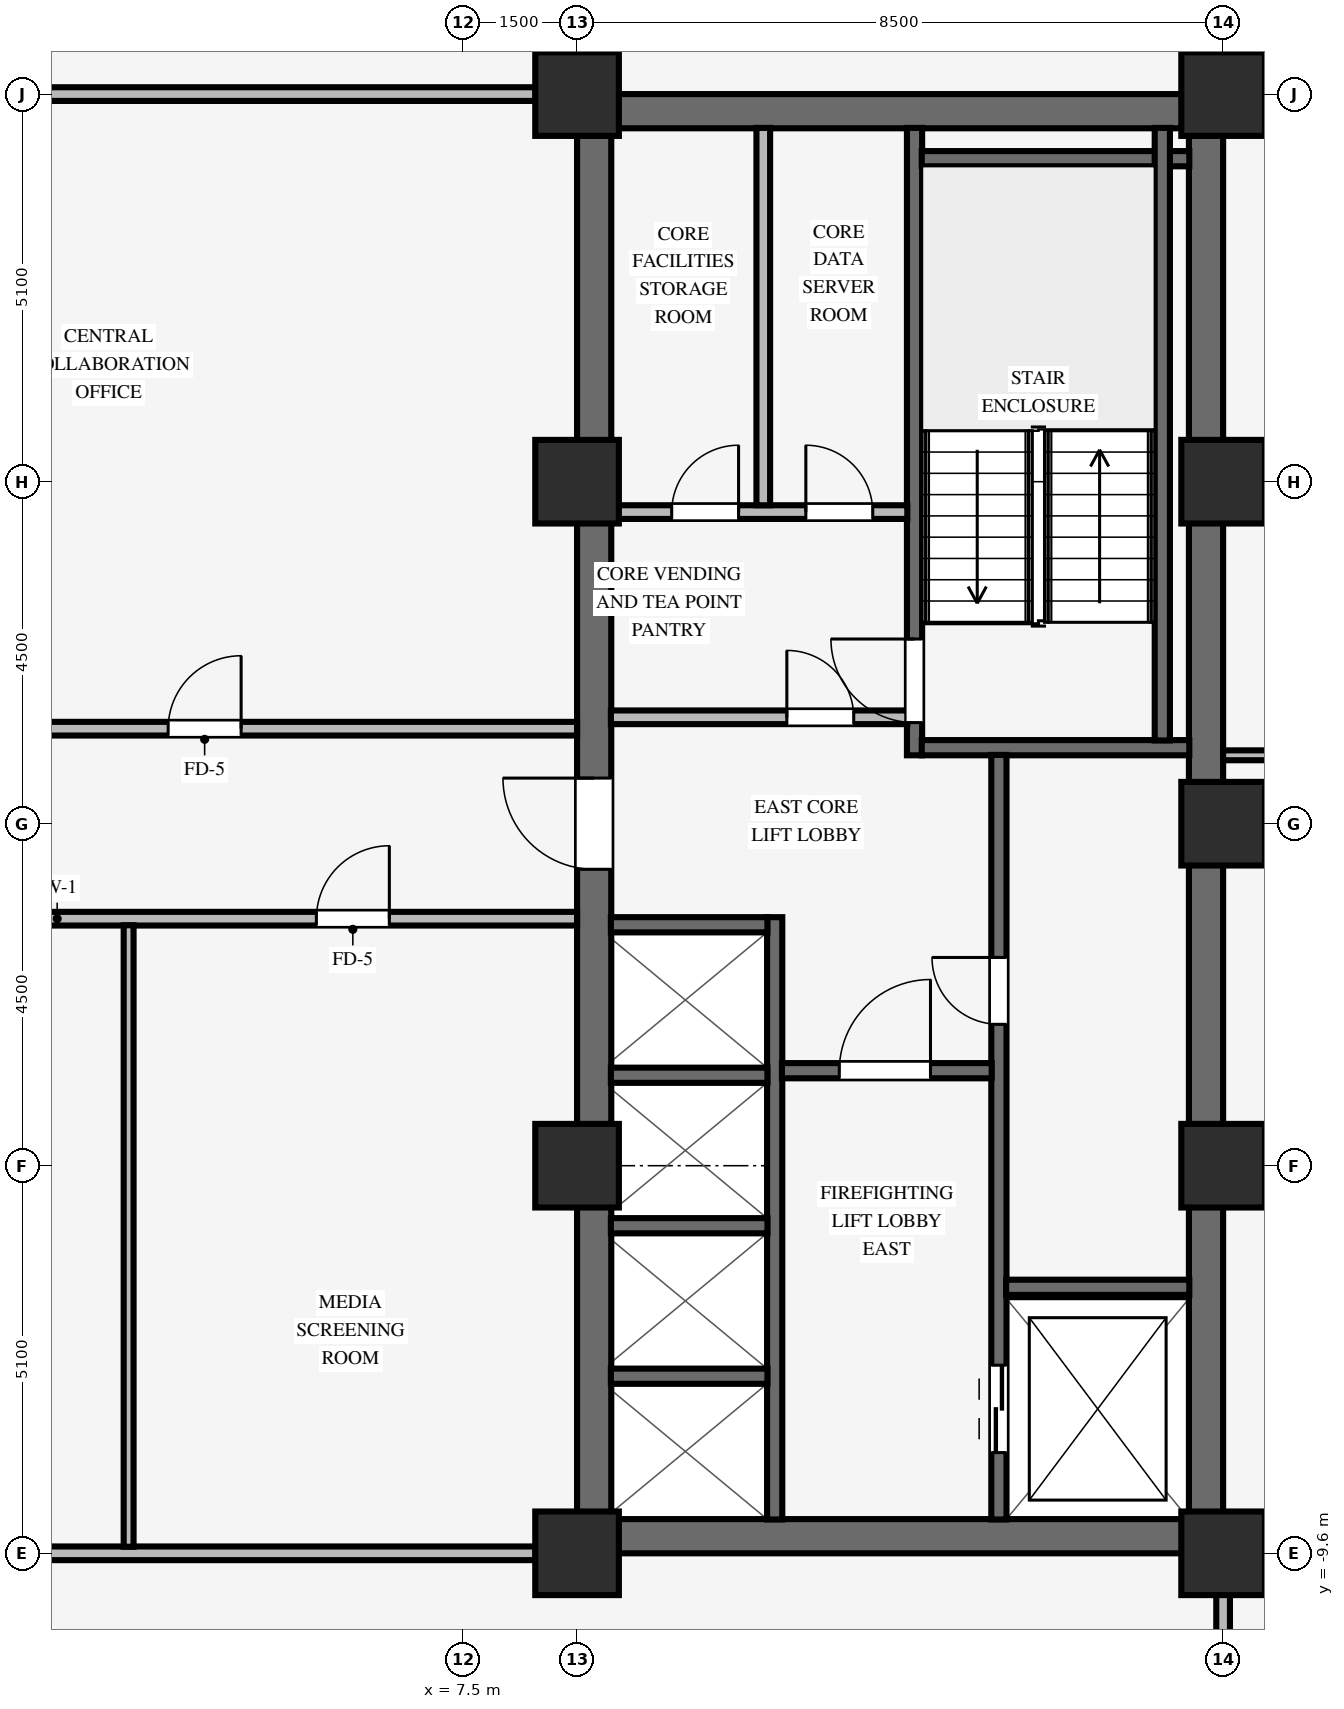
"""IFC4 building model, lengths in metres.
Left out: names, types, materials, properties, quantities, classifications, styles, units other than length and angle.
Written with IfcOpenShell. Run it as: python <this file> out.ifc"""

import sys

from ifc_helpers import new_model, si_unit, direction, frame, frame_2d, origin, origin_2d, place, context, subcontext, project, spatial, rectangle, extrude, source, transform, mapped, element, fill, save


model = new_model("IFC4")
c1 = context("Model", 3, precision=1e-05, world=origin(), true_north=direction((0.0, 1.0)))
c2 = subcontext(c1, "Body", "Model", "MODEL_VIEW")
j1 = project(units=[si_unit("LENGTHUNIT", "METRE"), si_unit("PLANEANGLEUNIT", "RADIAN")], contexts=[c1])
p1 = place(None, origin())
s1 = spatial("IfcSite", under=j1, at=p1, CompositionType="ELEMENT")
p2 = place(p1, origin())
s2 = spatial("IfcBuilding", under=s1, at=p2, CompositionType="ELEMENT")
p3 = place(p2, frame((0.0, 0.0, 60.45)))
s3 = spatial("IfcBuildingStorey", under=s2, at=p3, CompositionType="ELEMENT", Elevation=60.45)
for number, where, z_axis, x_axis in (
    (1, (9.0, -9.375, 0.0), (0.0, 0.0, 1.0), (1.0, 0.0, 0.0)),
    (2, (9.0, 9.375, 0.0), (0.0, 0.0, 1.0), (1.0, 0.0, 0.0)),
):
    element("IfcWall", number, at=place(p3, frame(where, z_axis=z_axis, x_axis=x_axis)), inside=s3, PredefinedType="SHEAR", context=c2, shape_type="SweptSolid", body=[
        extrude(rectangle(XDim=8.5, YDim=0.45, at=frame_2d((4.25, 0.0))), origin(), (0.0, 0.0, 1.0), 3.37),
    ])
p4 = place(p3, frame((9.225, -9.155, 0.0), z_axis=(0.0, 0.0, 1.0), x_axis=(0.0, 1.0, 0.0)))
e3 = element("IfcWall", 3, at=p4, inside=s3, PredefinedType="SHEAR", context=c2, shape_type="SweptSolid", body=[
    extrude(rectangle(XDim=18.31, YDim=0.45, at=frame_2d((9.155, 0.0))), origin(), (0.0, 0.0, 1.0), 3.37),
])
p5 = place(p4, frame((8.555, 0.0, 0.0)))
e4 = element("IfcOpeningElement", 4, at=p5, cuts=e3, PredefinedType="OPENING", context=c2, shape_type="SweptSolid", body=[
    extrude(rectangle(XDim=1.2, YDim=2.15, at=frame_2d((0.6, 1.075))), frame((0.0, 0.235, 0.0), z_axis=(0.0, -1.0, 0.0), x_axis=(1.0, 0.0, 0.0)), (0.0, 0.0, 1.0), 0.47),
])
p6 = place(p3, frame((17.275, -9.155, 0.0), z_axis=(0.0, 0.0, 1.0), x_axis=(0.0, 1.0, 0.0)))
e5 = element("IfcWall", 5, at=p6, inside=s3, PredefinedType="SHEAR", context=c2, shape_type="SweptSolid", body=[
    extrude(rectangle(XDim=18.31, YDim=0.45, at=frame_2d((9.155, 0.0))), origin(), (0.0, 0.0, 1.0), 3.37),
])
for number, where, z_axis, x_axis in (
    (6, (9.0, -9.6, 0.0), (0.0, 0.0, 1.0), (1.0, 0.0, 0.0)),
    (7, (9.0, -4.5, 0.0), (0.0, 0.0, 1.0), (1.0, 0.0, 0.0)),
    (8, (9.0, 4.5, 0.0), (0.0, 0.0, 1.0), (1.0, 0.0, 0.0)),
    (9, (9.0, 9.6, 0.0), (0.0, 0.0, 1.0), (1.0, 0.0, 0.0)),
    (10, (17.5, -9.6, 0.0), (0.0, 0.0, 1.0), (1.0, 0.0, 0.0)),
    (11, (17.5, -4.5, 0.0), (0.0, 0.0, 1.0), (1.0, 0.0, 0.0)),
    (12, (17.5, 4.5, 0.0), (0.0, 0.0, 1.0), (1.0, 0.0, 0.0)),
    (13, (17.5, 9.6, 0.0), (0.0, 0.0, 1.0), (1.0, 0.0, 0.0)),
    (14, (17.5, 0.0, 0.0), (0.0, 0.0, 1.0), (1.0, 0.0, 0.0)),
):
    element("IfcColumn", number, at=place(p3, frame(where, z_axis=z_axis, x_axis=x_axis)), inside=s3, PredefinedType="COLUMN", context=c2, shape_type="SweptSolid", body=[
        extrude(rectangle(XDim=1.1, YDim=1.1, at=origin_2d()), origin(), (0.0, 0.0, 1.0), 3.37),
    ])
p7 = place(p3, frame((13.44, 0.9, 0.0), z_axis=(0.0, 0.0, 1.0), x_axis=(0.0, 1.0, 0.0)))
e15 = element("IfcWall", 15, at=p7, inside=s3, PredefinedType="SHEAR", context=c2, shape_type="SweptSolid", body=[
    extrude(rectangle(XDim=8.255, YDim=0.2, at=frame_2d((4.127, 0.0))), origin(), (0.0, 0.0, 1.0), 3.37),
])
p8 = place(p7, frame((0.43, 0.0, 0.0)))
e16 = element("IfcOpeningElement", 16, at=p8, cuts=e15, PredefinedType="OPENING", context=c2, shape_type="SweptSolid", body=[
    extrude(rectangle(XDim=1.1, YDim=2.15, at=frame_2d((0.55, 1.075))), frame((0.0, 0.11, 0.0), z_axis=(0.0, -1.0, 0.0), x_axis=(1.0, 0.0, 0.0)), (0.0, 0.0, 1.0), 0.22),
])
for number, where, z_axis, x_axis in (
    (17, (13.535, 1.0, 0.0), (0.0, 0.0, 1.0), (1.0, 0.0, 0.0)),
    (18, (13.535, 8.75, 0.0), (0.0, 0.0, 1.0), (1.0, 0.0, 0.0)),
):
    element("IfcWall", number, at=place(p3, frame(where, z_axis=z_axis, x_axis=x_axis)), inside=s3, PredefinedType="SHEAR", context=c2, shape_type="SweptSolid", body=[
        extrude(rectangle(XDim=3.52, YDim=0.2, at=frame_2d((1.76, 0.0))), origin(), (0.0, 0.0, 1.0), 3.37),
    ])
p9 = place(p3, frame((16.7, 1.095, 0.0), z_axis=(0.0, 0.0, 1.0), x_axis=(0.0, 1.0, 0.0)))
e19 = element("IfcWall", 19, at=p9, inside=s3, PredefinedType="SHEAR", context=c2, shape_type="SweptSolid", body=[
    extrude(rectangle(XDim=8.06, YDim=0.2, at=frame_2d((4.03, 0.0))), origin(), (0.0, 0.0, 1.0), 3.37),
])
p10 = place(p3, frame((14.55, -9.155, 0.0), z_axis=(0.0, 0.0, 1.0), x_axis=(0.0, 1.0, 0.0)))
e20 = element("IfcWall", 20, at=p10, inside=s3, PredefinedType="SHEAR", context=c2, shape_type="SweptSolid", body=[
    extrude(rectangle(XDim=10.06, YDim=0.2, at=frame_2d((5.03, 0.0))), origin(), (0.0, 0.0, 1.0), 3.37),
])
p11 = place(p10, frame((6.515, 0.0, 0.0)))
e21 = element("IfcOpeningElement", 21, at=p11, cuts=e20, PredefinedType="OPENING", context=c2, shape_type="SweptSolid", body=[
    extrude(rectangle(XDim=0.88, YDim=2.1, at=frame_2d((0.44, 1.05))), frame((0.0, 0.11, 0.0), z_axis=(0.0, -1.0, 0.0), x_axis=(1.0, 0.0, 0.0)), (0.0, 0.0, 1.0), 0.22),
])
p12 = place(p10, frame((0.88, 0.0, 0.0)))
e22 = element("IfcOpeningElement", 22, at=p12, cuts=e20, PredefinedType="OPENING", context=c2, shape_type="SweptSolid", body=[
    extrude(rectangle(XDim=1.15, YDim=2.15, at=frame_2d((0.575, 1.075))), frame((0.0, 0.11, 0.0), z_axis=(0.0, -1.0, 0.0), x_axis=(1.0, 0.0, 0.0)), (0.0, 0.0, 1.0), 0.22),
])
p13 = place(p3, frame((14.645, -6.1, 0.0), z_axis=(0.0, 0.0, 1.0), x_axis=(1.0, 0.0, 0.0)))
e23 = element("IfcWall", 23, at=p13, inside=s3, PredefinedType="SHEAR", context=c2, shape_type="SweptSolid", body=[
    extrude(rectangle(XDim=2.41, YDim=0.2, at=frame_2d((1.205, 0.0))), origin(), (0.0, 0.0, 1.0), 3.37),
])
p14 = place(p3, frame((11.6, -9.155, 0.0), z_axis=(0.0, 0.0, 1.0), x_axis=(0.0, 1.0, 0.0)))
e24 = element("IfcWall", 24, at=p14, inside=s3, PredefinedType="SHEAR", context=c2, shape_type="SweptSolid", body=[
    extrude(rectangle(XDim=7.925, YDim=0.2, at=frame_2d((3.962, 0.0))), origin(), (0.0, 0.0, 1.0), 3.37),
])
p15 = place(p3, frame((11.695, -3.25, 0.0), z_axis=(0.0, 0.0, 1.0), x_axis=(1.0, 0.0, 0.0)))
e25 = element("IfcWall", 25, at=p15, inside=s3, PredefinedType="SHEAR", context=c2, shape_type="SweptSolid", body=[
    extrude(rectangle(XDim=2.76, YDim=0.2, at=frame_2d((1.38, 0.0))), origin(), (0.0, 0.0, 1.0), 3.37),
])
p16 = place(p15, frame((0.755, 0.0, 0.0)))
e26 = element("IfcOpeningElement", 26, at=p16, cuts=e25, PredefinedType="OPENING", context=c2, shape_type="SweptSolid", body=[
    extrude(rectangle(XDim=1.2, YDim=2.15, at=frame_2d((0.6, 1.075))), frame((0.0, 0.11, 0.0), z_axis=(0.0, -1.0, 0.0), x_axis=(1.0, 0.0, 0.0)), (0.0, 0.0, 1.0), 0.22),
])
for number, where, z_axis, x_axis in (
    (27, (9.445, -7.27, 0.0), (0.0, 0.0, 1.0), (1.0, 0.0, 0.0)),
    (28, (9.445, -5.29, 0.0), (0.0, 0.0, 1.0), (1.0, 0.0, 0.0)),
    (29, (9.445, -3.31, 0.0), (0.0, 0.0, 1.0), (1.0, 0.0, 0.0)),
    (30, (9.445, -1.33, 0.0), (0.0, 0.0, 1.0), (1.0, 0.0, 0.0)),
):
    element("IfcWall", number, at=place(p3, frame(where, z_axis=z_axis, x_axis=x_axis)), inside=s3, PredefinedType="SHEAR", context=c2, shape_type="SweptSolid", body=[
        extrude(rectangle(XDim=2.06, YDim=0.2, at=frame_2d((1.03, 0.0))), origin(), (0.0, 0.0, 1.0), 3.37),
    ])
p17 = place(p3, frame((9.445, 1.4, 0.0), z_axis=(0.0, 0.0, 1.0), x_axis=(1.0, 0.0, 0.0)))
e31 = element("IfcWall", 31, at=p17, inside=s3, PredefinedType="PARTITIONING", context=c2, shape_type="SweptSolid", body=[
    extrude(rectangle(XDim=3.9, YDim=0.18, at=frame_2d((1.95, 0.0))), origin(), (0.0, 0.0, 1.0), 3.36),
])
p18 = place(p17, frame((2.315, 0.0, 0.0)))
e32 = element("IfcOpeningElement", 32, at=p18, cuts=e31, PredefinedType="OPENING", context=c2, shape_type="SweptSolid", body=[
    extrude(rectangle(XDim=0.88, YDim=2.1, at=frame_2d((0.44, 1.05))), frame((0.0, 0.1, 0.0), z_axis=(0.0, -1.0, 0.0), x_axis=(1.0, 0.0, 0.0)), (0.0, 0.0, 1.0), 0.2),
])
p19 = place(p3, frame((9.445, 4.1, 0.0), z_axis=(0.0, 0.0, 1.0), x_axis=(1.0, 0.0, 0.0)))
e33 = element("IfcWall", 33, at=p19, inside=s3, PredefinedType="PARTITIONING", context=c2, shape_type="SweptSolid", body=[
    extrude(rectangle(XDim=3.9, YDim=0.18, at=frame_2d((1.95, 0.0))), origin(), (0.0, 0.0, 1.0), 3.36),
])
p20 = place(p19, frame((0.8, 0.0, 0.0)))
e34 = element("IfcOpeningElement", 34, at=p20, cuts=e33, PredefinedType="OPENING", context=c2, shape_type="SweptSolid", body=[
    extrude(rectangle(XDim=0.88, YDim=2.1, at=frame_2d((0.44, 1.05))), frame((0.0, 0.1, 0.0), z_axis=(0.0, -1.0, 0.0), x_axis=(1.0, 0.0, 0.0)), (0.0, 0.0, 1.0), 0.2),
])
p21 = place(p19, frame((2.565, 0.0, 0.0)))
e35 = element("IfcOpeningElement", 35, at=p21, cuts=e33, PredefinedType="OPENING", context=c2, shape_type="SweptSolid", body=[
    extrude(rectangle(XDim=0.88, YDim=2.1, at=frame_2d((0.44, 1.05))), frame((0.0, 0.1, 0.0), z_axis=(0.0, -1.0, 0.0), x_axis=(1.0, 0.0, 0.0)), (0.0, 0.0, 1.0), 0.2),
])
p22 = place(p3, frame((11.45, 4.19, 0.0), z_axis=(0.0, 0.0, 1.0), x_axis=(0.0, 1.0, 0.0)))
e36 = element("IfcWall", 36, at=p22, inside=s3, PredefinedType="PARTITIONING", context=c2, shape_type="SweptSolid", body=[
    extrude(rectangle(XDim=4.965, YDim=0.18, at=frame_2d((2.482, 0.0))), origin(), (0.0, 0.0, 1.0), 3.36),
])
p23 = place(p3, frame((0.176, -9.6, 0.0), z_axis=(0.0, 0.0, 1.0), x_axis=(1.0, 0.0, 0.0)))
e37 = element("IfcWall", 37, at=p23, inside=s3, PredefinedType="PARTITIONING", context=c2, shape_type="SweptSolid", body=[
    extrude(rectangle(XDim=8.278, YDim=0.18, at=frame_2d((4.139, 0.0))), origin(), (0.0, 0.0, 1.0), 2.405),
])
p24 = place(p3, frame((-0.8, -1.25, 0.0), z_axis=(0.0, 0.0, 1.0), x_axis=(1.0, 0.0, 0.0)))
e38 = element("IfcWall", 38, at=p24, inside=s3, PredefinedType="PARTITIONING", context=c2, shape_type="SweptSolid", body=[
    extrude(rectangle(XDim=9.8, YDim=0.18, at=frame_2d((4.9, 0.0))), origin(), (0.0, 0.0, 1.0), 3.36),
])
p25 = place(p24, frame((6.37, 0.0, 0.0)))
e39 = element("IfcOpeningElement", 39, at=p25, cuts=e38, PredefinedType="OPENING", context=c2, shape_type="SweptSolid", body=[
    extrude(rectangle(XDim=0.96, YDim=2.1, at=frame_2d((0.48, 1.05))), frame((0.0, 0.1, 0.0), z_axis=(0.0, -1.0, 0.0), x_axis=(1.0, 0.0, 0.0)), (0.0, 0.0, 1.0), 0.2),
])
p26 = place(p3, frame((17.5, 0.9, 0.0), z_axis=(0.0, 0.0, 1.0), x_axis=(1.0, 0.0, 0.0)))
e40 = element("IfcWall", 40, at=p26, inside=s3, PredefinedType="PARTITIONING", context=c2, shape_type="SweptSolid", body=[
    extrude(rectangle(XDim=3.66, YDim=0.13, at=frame_2d((1.83, 0.0))), origin(), (0.0, 0.0, 1.0), 3.36),
])
p27 = place(p3, frame((-0.8, 1.25, 0.0), z_axis=(0.0, 0.0, 1.0), x_axis=(1.0, 0.0, 0.0)))
e41 = element("IfcWall", 41, at=p27, inside=s3, PredefinedType="PARTITIONING", context=c2, shape_type="SweptSolid", body=[
    extrude(rectangle(XDim=9.8, YDim=0.18, at=frame_2d((4.9, 0.0))), origin(), (0.0, 0.0, 1.0), 3.36),
])
p28 = place(p27, frame((4.42, 0.0, 0.0)))
e42 = element("IfcOpeningElement", 42, at=p28, cuts=e41, PredefinedType="OPENING", context=c2, shape_type="SweptSolid", body=[
    extrude(rectangle(XDim=0.96, YDim=2.1, at=frame_2d((0.48, 1.05))), frame((0.0, 0.1, 0.0), z_axis=(0.0, -1.0, 0.0), x_axis=(1.0, 0.0, 0.0)), (0.0, 0.0, 1.0), 0.2),
])
p29 = place(p3, frame((0.176, 9.6, 0.0), z_axis=(0.0, 0.0, 1.0), x_axis=(1.0, 0.0, 0.0)))
e43 = element("IfcWall", 43, at=p29, inside=s3, PredefinedType="PARTITIONING", context=c2, shape_type="SweptSolid", body=[
    extrude(rectangle(XDim=8.278, YDim=0.18, at=frame_2d((4.139, 0.0))), origin(), (0.0, 0.0, 1.0), 2.405),
])
p30 = place(p3, frame((3.1, -9.514, 0.0), z_axis=(0.0, 0.0, 1.0), x_axis=(0.0, 1.0, 0.0)))
e44 = element("IfcWall", 44, at=p30, inside=s3, PredefinedType="PARTITIONING", context=c2, shape_type="SweptSolid", body=[
    extrude(rectangle(XDim=8.178, YDim=0.13, at=frame_2d((4.089, 0.0))), origin(), (0.0, 0.0, 1.0), 3.36),
])
for number, where, z_axis, x_axis in (
    (45, (17.5, -11.114, 0.0), (0.0, 0.0, 1.0), (0.0, 1.0, 0.0)),
    (46, (17.5, 10.146, 0.0), (0.0, 0.0, 1.0), (0.0, 1.0, 0.0)),
):
    element("IfcWall", number, at=place(p3, frame(where, z_axis=z_axis, x_axis=x_axis)), inside=s3, PredefinedType="PARTITIONING", context=c2, shape_type="SweptSolid", body=[
        extrude(rectangle(XDim=0.968, YDim=0.18, at=frame_2d((0.484, 0.0))), origin(), (0.0, 0.0, 1.0), 2.738),
    ])
m1 = source(origin(), c2, "Body", "SweptSolid", [
    extrude(rectangle(XDim=1.1, YDim=2.15, at=frame_2d((0.55, 1.075))), frame((0.0, 0.025, 0.0), z_axis=(0.0, -1.0, 0.0), x_axis=(1.0, 0.0, 0.0)), (0.0, 0.0, 1.0), 0.05),
])
p31 = place(p8, origin())
e47 = element("IfcDoor", 47, at=p31, inside=s3, OperationType="SINGLE_SWING_RIGHT", PredefinedType="DOOR", context=c2, shape_type="MappedRepresentation", body=[
    mapped(m1, transform((0.0, 0.0, 0.0), scale=1.0)),
])
fill(e16, e47)
m2 = source(origin(), c2, "Body", "SweptSolid", [
    extrude(rectangle(XDim=0.88, YDim=2.1, at=frame_2d((0.44, 1.05))), frame((0.0, 0.025, 0.0), z_axis=(0.0, -1.0, 0.0), x_axis=(1.0, 0.0, 0.0)), (0.0, 0.0, 1.0), 0.05),
])
p32 = place(p11, origin())
e48 = element("IfcDoor", 48, at=p32, inside=s3, OperationType="SINGLE_SWING_RIGHT", PredefinedType="DOOR", context=c2, shape_type="MappedRepresentation", body=[
    mapped(m2, transform((0.0, 0.0, 0.0), scale=1.0)),
])
fill(e21, e48)
m3 = source(origin(), c2, "Body", "SweptSolid", [
    extrude(rectangle(XDim=1.2, YDim=2.15, at=frame_2d((0.6, 1.075))), frame((0.0, 0.025, 0.0), z_axis=(0.0, -1.0, 0.0), x_axis=(1.0, 0.0, 0.0)), (0.0, 0.0, 1.0), 0.05),
])
p33 = place(p16, origin())
e49 = element("IfcDoor", 49, at=p33, inside=s3, OperationType="SINGLE_SWING_RIGHT", PredefinedType="DOOR", context=c2, shape_type="MappedRepresentation", body=[
    mapped(m3, transform((0.0, 0.0, 0.0), scale=1.0)),
])
fill(e26, e49)
p34 = place(p5, origin())
e50 = element("IfcDoor", 50, at=p34, inside=s3, OperationType="SINGLE_SWING_RIGHT", PredefinedType="DOOR", context=c2, shape_type="MappedRepresentation", body=[
    mapped(m3, transform((0.0, 0.0, 0.0), scale=1.0)),
])
fill(e4, e50)
p35 = place(p18, origin())
e51 = element("IfcDoor", 51, at=p35, inside=s3, OperationType="SINGLE_SWING_LEFT", PredefinedType="DOOR", context=c2, shape_type="MappedRepresentation", body=[
    mapped(m2, transform((0.0, 0.0, 0.0), scale=1.0)),
])
fill(e32, e51)
p36 = place(p20, origin())
e52 = element("IfcDoor", 52, at=p36, inside=s3, OperationType="SINGLE_SWING_RIGHT", PredefinedType="DOOR", context=c2, shape_type="MappedRepresentation", body=[
    mapped(m2, transform((0.0, 0.0, 0.0), scale=1.0)),
])
fill(e34, e52)
p37 = place(p21, origin())
e53 = element("IfcDoor", 53, at=p37, inside=s3, OperationType="SINGLE_SWING_LEFT", PredefinedType="DOOR", context=c2, shape_type="MappedRepresentation", body=[
    mapped(m2, transform((0.0, 0.0, 0.0), scale=1.0)),
])
fill(e35, e53)
m4 = source(origin(), c2, "Body", "SweptSolid", [
    extrude(rectangle(XDim=1.15, YDim=2.15, at=frame_2d((0.575, 1.075))), frame((0.0, 0.025, 0.0), z_axis=(0.0, -1.0, 0.0), x_axis=(1.0, 0.0, 0.0)), (0.0, 0.0, 1.0), 0.05),
])
p38 = place(p12, origin())
e54 = element("IfcDoor", 54, at=p38, inside=s3, OperationType="DOUBLE_DOOR_SLIDING", PredefinedType="DOOR", context=c2, shape_type="MappedRepresentation", body=[
    mapped(m4, transform((0.0, 0.0, 0.0), scale=1.0)),
])
fill(e22, e54)
m5 = source(origin(), c2, "Body", "SweptSolid", [
    extrude(rectangle(XDim=0.96, YDim=2.1, at=frame_2d((0.48, 1.05))), frame((0.0, 0.025, 0.0), z_axis=(0.0, -1.0, 0.0), x_axis=(1.0, 0.0, 0.0)), (0.0, 0.0, 1.0), 0.05),
])
p39 = place(p28, origin())
e55 = element("IfcDoor", 55, at=p39, inside=s3, OperationType="SINGLE_SWING_RIGHT", PredefinedType="DOOR", context=c2, shape_type="MappedRepresentation", body=[
    mapped(m5, transform((0.0, 0.0, 0.0), scale=1.0)),
])
fill(e42, e55)
p40 = place(p25, origin())
e56 = element("IfcDoor", 56, at=p40, inside=s3, OperationType="SINGLE_SWING_RIGHT", PredefinedType="DOOR", context=c2, shape_type="MappedRepresentation", body=[
    mapped(m5, transform((0.0, 0.0, 0.0), scale=1.0)),
])
fill(e39, e56)
save(model, sys.argv[1])
